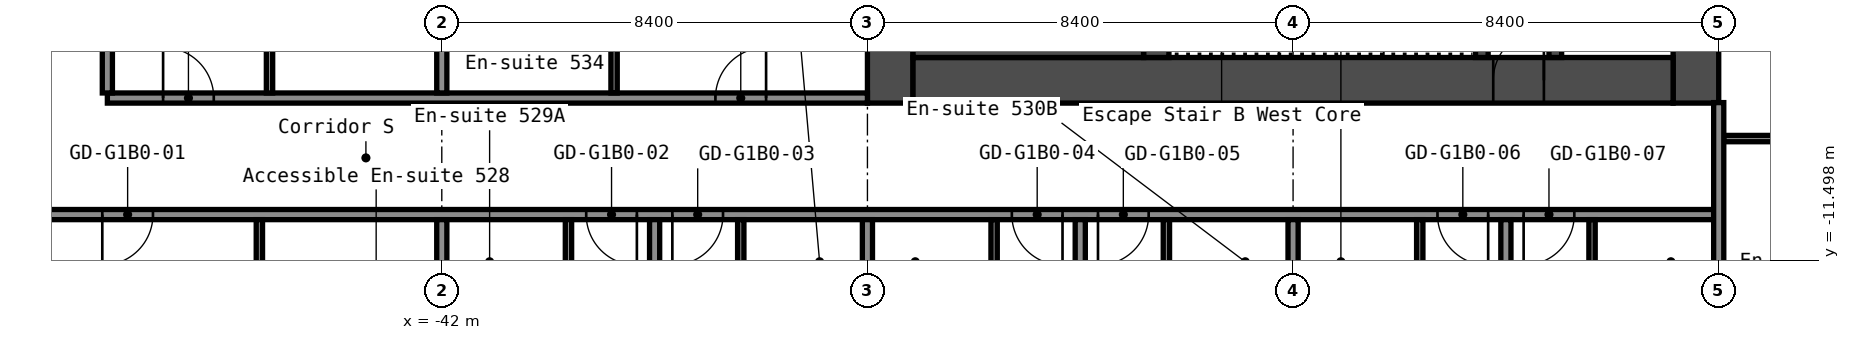
"""IFC4 building model, lengths in metres.
Left out: names, types, materials, properties, quantities, classifications, styles, units other than length and angle.
Written with IfcOpenShell. Run it as: python <this file> out.ifc"""

import sys

from ifc_helpers import new_model, si_unit, direction, frame, frame_2d, origin, place, context, subcontext, project, spatial, rectangle, extrude, element, fill, save


model = new_model("IFC4")
c1 = context("Model", 3, precision=1e-05, world=origin(), true_north=direction((0.0, 1.0)))
c2 = subcontext(c1, "Body", "Model", "MODEL_VIEW")
j1 = project(units=[si_unit("LENGTHUNIT", "METRE"), si_unit("PLANEANGLEUNIT", "RADIAN")], contexts=[c1])
p1 = place(None, origin())
s1 = spatial("IfcSite", under=j1, at=p1, CompositionType="ELEMENT")
p2 = place(p1, origin())
s2 = spatial("IfcBuilding", under=s1, at=p2, CompositionType="ELEMENT")
p3 = place(p2, frame((0.0, 0.0, 23.0)))
s3 = spatial("IfcBuildingStorey", under=s2, at=p3, CompositionType="ELEMENT", Elevation=23.0)
p4 = place(p3, frame((-17.25, -8.4, 0.0), z_axis=(0.0, 0.0, 1.0), x_axis=(0.0, 1.0, 0.0)))
e1 = element("IfcWall", 1, at=p4, inside=s3, PredefinedType="SHEAR", context=c2, shape_type="SweptSolid", body=[
    extrude(rectangle(XDim=16.8, YDim=0.9, at=frame_2d((8.4, 0.0))), origin(), (0.0, 0.0, 1.0), 2.8),
])
p5 = place(p4, frame((12.75, 0.0, 0.0)))
e2 = element("IfcOpeningElement", 2, at=p5, cuts=e1, PredefinedType="OPENING", context=c2, shape_type="SweptSolid", body=[
    extrude(rectangle(XDim=1.2, YDim=2.1, at=frame_2d((0.6, 1.05))), frame((0.0, 0.46, 0.0), z_axis=(0.0, -1.0, 0.0), x_axis=(1.0, 0.0, 0.0)), (0.0, 0.0, 1.0), 0.92),
])
p6 = place(p4, frame((2.85, 0.0, 0.0)))
e3 = element("IfcOpeningElement", 3, at=p6, cuts=e1, PredefinedType="OPENING", context=c2, shape_type="SweptSolid", body=[
    extrude(rectangle(XDim=1.2, YDim=2.1, at=frame_2d((0.6, 1.05))), frame((0.0, 0.46, 0.0), z_axis=(0.0, -1.0, 0.0), x_axis=(1.0, 0.0, 0.0)), (0.0, 0.0, 1.0), 0.92),
])
p7 = place(p3, frame((-33.15, -8.4, 0.0), z_axis=(0.0, 0.0, 1.0), x_axis=(0.0, 1.0, 0.0)))
e4 = element("IfcWall", 4, at=p7, inside=s3, PredefinedType="SHEAR", context=c2, shape_type="SweptSolid", body=[
    extrude(rectangle(XDim=16.8, YDim=0.9, at=frame_2d((8.4, 0.0))), origin(), (0.0, 0.0, 1.0), 2.8),
])
p8 = place(p3, frame((-32.7, -7.95, 0.0), z_axis=(0.0, 0.0, 1.0), x_axis=(1.0, 0.0, 0.0)))
e5 = element("IfcWall", 5, at=p8, inside=s3, PredefinedType="SHEAR", context=c2, shape_type="SweptSolid", body=[
    extrude(rectangle(XDim=15.0, YDim=0.9, at=frame_2d((7.5, 0.0))), origin(), (0.0, 0.0, 1.0), 2.8),
])
p9 = place(p8, frame((11.45, 0.0, 0.0)))
e6 = element("IfcOpeningElement", 6, at=p9, cuts=e5, PredefinedType="OPENING", context=c2, shape_type="SweptSolid", body=[
    extrude(rectangle(XDim=1.0, YDim=2.1, at=frame_2d((0.5, 1.05))), frame((0.0, 0.46, 0.0), z_axis=(0.0, -1.0, 0.0), x_axis=(1.0, 0.0, 0.0)), (0.0, 0.0, 1.0), 0.92),
])
p10 = place(p3, frame((-20.025, -7.5, 0.0), z_axis=(0.0, 0.0, 1.0), x_axis=(0.0, 1.0, 0.0)))
e7 = element("IfcWall", 7, at=p10, inside=s3, PredefinedType="SHEAR", context=c2, shape_type="SweptSolid", body=[
    extrude(rectangle(XDim=6.3, YDim=0.25, at=frame_2d((3.15, 0.0))), origin(), (0.0, 0.0, 1.0), 2.8),
])
p11 = place(p10, frame((2.4, 0.0, 0.0)))
e8 = element("IfcOpeningElement", 8, at=p11, cuts=e7, PredefinedType="OPENING", context=c2, shape_type="SweptSolid", body=[
    extrude(rectangle(XDim=1.0, YDim=2.1, at=frame_2d((0.5, 1.05))), frame((0.0, 0.135, 0.0), z_axis=(0.0, -1.0, 0.0), x_axis=(1.0, 0.0, 0.0)), (0.0, 0.0, 1.0), 0.27),
])
p12 = place(p3, frame((-21.475, -7.5, 0.0), z_axis=(0.0, 0.0, 1.0), x_axis=(0.0, 1.0, 0.0)))
e9 = element("IfcWall", 9, at=p12, inside=s3, PredefinedType="SHEAR", context=c2, shape_type="SweptSolid", body=[
    extrude(rectangle(XDim=3.75, YDim=0.25, at=frame_2d((1.875, 0.0))), origin(), (0.0, 0.0, 1.0), 2.8),
])
p13 = place(p12, frame((1.3, 0.0, 0.0)))
e10 = element("IfcOpeningElement", 10, at=p13, cuts=e9, PredefinedType="OPENING", context=c2, shape_type="SweptSolid", body=[
    extrude(rectangle(XDim=1.2, YDim=2.1, at=frame_2d((0.6, 1.05))), frame((0.0, 0.135, 0.0), z_axis=(0.0, -1.0, 0.0), x_axis=(1.0, 0.0, 0.0)), (0.0, 0.0, 1.0), 0.27),
])
p14 = place(p3, frame((-27.9, -7.5, 0.0), z_axis=(0.0, 0.0, 1.0), x_axis=(0.0, 1.0, 0.0)))
e11 = element("IfcWall", 11, at=p14, inside=s3, PredefinedType="SHEAR", context=c2, shape_type="SweptSolid", body=[
    extrude(rectangle(XDim=3.75, YDim=0.5, at=frame_2d((1.875, 0.0))), origin(), (0.0, 0.0, 1.0), 2.8),
])
p15 = place(p3, frame((-32.7, -6.75, 0.0), z_axis=(0.0, 0.0, 1.0), x_axis=(1.0, 0.0, 0.0)))
e12 = element("IfcWall", 12, at=p15, inside=s3, PredefinedType="SHEAR", context=c2, shape_type="SweptSolid", body=[
    extrude(rectangle(XDim=4.55, YDim=1.5, at=frame_2d((2.275, 0.0))), origin(), (0.0, 0.0, 1.0), 2.8),
])
p16 = place(p3, frame((-51.1, -10.6, 0.0), z_axis=(0.0, 0.0, 1.0), x_axis=(1.0, 0.0, 0.0)))
e13 = element("IfcWall", 13, at=p16, inside=s3, PredefinedType="PARTITIONING", context=c2, shape_type="SweptSolid", body=[
    extrude(rectangle(XDim=34.3, YDim=0.2, at=frame_2d((17.15, 0.0))), origin(), (0.0, 0.0, 1.0), 2.8),
])
p17 = place(p16, frame((2.4, 0.0, 0.0)))
e14 = element("IfcOpeningElement", 14, at=p17, cuts=e13, PredefinedType="OPENING", context=c2, shape_type="SweptSolid", body=[
    extrude(rectangle(XDim=1.0, YDim=2.1, at=frame_2d((0.5, 1.05))), frame((0.0, 0.11, 0.0), z_axis=(0.0, -1.0, 0.0), x_axis=(1.0, 0.0, 0.0)), (0.0, 0.0, 1.0), 0.22),
])
p18 = place(p16, frame((11.95, 0.0, 0.0)))
e15 = element("IfcOpeningElement", 15, at=p18, cuts=e13, PredefinedType="OPENING", context=c2, shape_type="SweptSolid", body=[
    extrude(rectangle(XDim=1.0, YDim=2.1, at=frame_2d((0.5, 1.05))), frame((0.0, 0.11, 0.0), z_axis=(0.0, -1.0, 0.0), x_axis=(1.0, 0.0, 0.0)), (0.0, 0.0, 1.0), 0.22),
])
p19 = place(p16, frame((13.65, 0.0, 0.0)))
e16 = element("IfcOpeningElement", 16, at=p19, cuts=e13, PredefinedType="OPENING", context=c2, shape_type="SweptSolid", body=[
    extrude(rectangle(XDim=1.0, YDim=2.1, at=frame_2d((0.5, 1.05))), frame((0.0, 0.11, 0.0), z_axis=(0.0, -1.0, 0.0), x_axis=(1.0, 0.0, 0.0)), (0.0, 0.0, 1.0), 0.22),
])
p20 = place(p16, frame((20.35, 0.0, 0.0)))
e17 = element("IfcOpeningElement", 17, at=p20, cuts=e13, PredefinedType="OPENING", context=c2, shape_type="SweptSolid", body=[
    extrude(rectangle(XDim=1.0, YDim=2.1, at=frame_2d((0.5, 1.05))), frame((0.0, 0.11, 0.0), z_axis=(0.0, -1.0, 0.0), x_axis=(1.0, 0.0, 0.0)), (0.0, 0.0, 1.0), 0.22),
])
p21 = place(p16, frame((22.05, 0.0, 0.0)))
e18 = element("IfcOpeningElement", 18, at=p21, cuts=e13, PredefinedType="OPENING", context=c2, shape_type="SweptSolid", body=[
    extrude(rectangle(XDim=1.0, YDim=2.1, at=frame_2d((0.5, 1.05))), frame((0.0, 0.11, 0.0), z_axis=(0.0, -1.0, 0.0), x_axis=(1.0, 0.0, 0.0)), (0.0, 0.0, 1.0), 0.22),
])
p22 = place(p16, frame((28.75, 0.0, 0.0)))
e19 = element("IfcOpeningElement", 19, at=p22, cuts=e13, PredefinedType="OPENING", context=c2, shape_type="SweptSolid", body=[
    extrude(rectangle(XDim=1.0, YDim=2.1, at=frame_2d((0.5, 1.05))), frame((0.0, 0.11, 0.0), z_axis=(0.0, -1.0, 0.0), x_axis=(1.0, 0.0, 0.0)), (0.0, 0.0, 1.0), 0.22),
])
p23 = place(p16, frame((30.45, 0.0, 0.0)))
e20 = element("IfcOpeningElement", 20, at=p23, cuts=e13, PredefinedType="OPENING", context=c2, shape_type="SweptSolid", body=[
    extrude(rectangle(XDim=1.0, YDim=2.1, at=frame_2d((0.5, 1.05))), frame((0.0, 0.11, 0.0), z_axis=(0.0, -1.0, 0.0), x_axis=(1.0, 0.0, 0.0)), (0.0, 0.0, 1.0), 0.22),
])
p24 = place(p3, frame((-16.7, -9.1, 0.0), z_axis=(0.0, 0.0, 1.0), x_axis=(1.0, 0.0, 0.0)))
e21 = element("IfcWall", 21, at=p24, inside=s3, PredefinedType="PARTITIONING", context=c2, shape_type="SweptSolid", body=[
    extrude(rectangle(XDim=2.337, YDim=0.125, at=frame_2d((1.169, 0.0))), origin(), (0.0, 0.0, 1.0), 2.8),
])
p25 = place(p3, frame((-48.6, -8.3, 0.0), z_axis=(0.0, 0.0, 1.0), x_axis=(1.0, 0.0, 0.0)))
e22 = element("IfcWall", 22, at=p25, inside=s3, PredefinedType="PARTITIONING", context=c2, shape_type="SweptSolid", body=[
    extrude(rectangle(XDim=15.0, YDim=0.2, at=frame_2d((7.5, 0.0))), origin(), (0.0, 0.0, 1.0), 2.8),
])
p26 = place(p25, frame((1.1, 0.0, 0.0)))
e23 = element("IfcOpeningElement", 23, at=p26, cuts=e22, PredefinedType="OPENING", context=c2, shape_type="SweptSolid", body=[
    extrude(rectangle(XDim=1.0, YDim=2.1, at=frame_2d((0.5, 1.05))), frame((0.0, 0.11, 0.0), z_axis=(0.0, -1.0, 0.0), x_axis=(1.0, 0.0, 0.0)), (0.0, 0.0, 1.0), 0.22),
])
p27 = place(p25, frame((12.0, 0.0, 0.0)))
e24 = element("IfcOpeningElement", 24, at=p27, cuts=e22, PredefinedType="OPENING", context=c2, shape_type="SweptSolid", body=[
    extrude(rectangle(XDim=1.0, YDim=2.1, at=frame_2d((0.5, 1.05))), frame((0.0, 0.11, 0.0), z_axis=(0.0, -1.0, 0.0), x_axis=(1.0, 0.0, 0.0)), (0.0, 0.0, 1.0), 0.22),
])
p28 = place(p3, frame((-48.6, -8.2, 0.0), z_axis=(0.0, 0.0, 1.0), x_axis=(0.0, 1.0, 0.0)))
e25 = element("IfcWall", 25, at=p28, inside=s3, PredefinedType="PARTITIONING", context=c2, shape_type="SweptSolid", body=[
    extrude(rectangle(XDim=16.4, YDim=0.2, at=frame_2d((8.2, 0.0))), origin(), (0.0, 0.0, 1.0), 2.8),
])
p29 = place(p3, frame((-45.6, -14.0, 0.0), z_axis=(0.0, 0.0, 1.0), x_axis=(0.0, 1.0, 0.0)))
e26 = element("IfcWall", 26, at=p29, inside=s3, PredefinedType="PARTITIONING", context=c2, shape_type="SweptSolid", body=[
    extrude(rectangle(XDim=3.3, YDim=0.125, at=frame_2d((1.65, 0.0))), origin(), (0.0, 0.0, 1.0), 2.8),
])
p30 = place(p29, frame((1.2, 0.0, 0.0)))
e27 = element("IfcOpeningElement", 27, at=p30, cuts=e26, PredefinedType="OPENING", context=c2, shape_type="SweptSolid", body=[
    extrude(rectangle(XDim=1.0, YDim=2.1, at=frame_2d((0.5, 1.05))), frame((0.0, 0.073, 0.0), z_axis=(0.0, -1.0, 0.0), x_axis=(1.0, 0.0, 0.0)), (0.0, 0.0, 1.0), 0.145),
])
p31 = place(p3, frame((-45.4, -8.2, 0.0), z_axis=(0.0, 0.0, 1.0), x_axis=(0.0, 1.0, 0.0)))
e28 = element("IfcWall", 28, at=p31, inside=s3, PredefinedType="PARTITIONING", context=c2, shape_type="SweptSolid", body=[
    extrude(rectangle(XDim=3.3, YDim=0.125, at=frame_2d((1.65, 0.0))), origin(), (0.0, 0.0, 1.0), 2.8),
])
p32 = place(p3, frame((-42.0, -20.3, 0.0), z_axis=(0.0, 0.0, 1.0), x_axis=(0.0, 1.0, 0.0)))
e29 = element("IfcWall", 29, at=p32, inside=s3, PredefinedType="PARTITIONING", context=c2, shape_type="SweptSolid", body=[
    extrude(rectangle(XDim=9.6, YDim=0.2, at=frame_2d((4.8, 0.0))), origin(), (0.0, 0.0, 1.0), 2.8),
])
p33 = place(p3, frame((-42.0, -8.2, 0.0), z_axis=(0.0, 0.0, 1.0), x_axis=(0.0, 1.0, 0.0)))
e30 = element("IfcWall", 30, at=p33, inside=s3, PredefinedType="PARTITIONING", context=c2, shape_type="SweptSolid", body=[
    extrude(rectangle(XDim=8.2, YDim=0.2, at=frame_2d((4.1, 0.0))), origin(), (0.0, 0.0, 1.0), 2.8),
])
p34 = place(p3, frame((-39.5, -13.6, 0.0), z_axis=(0.0, 0.0, 1.0), x_axis=(0.0, 1.0, 0.0)))
e31 = element("IfcWall", 31, at=p34, inside=s3, PredefinedType="PARTITIONING", context=c2, shape_type="SweptSolid", body=[
    extrude(rectangle(XDim=2.9, YDim=0.125, at=frame_2d((1.45, 0.0))), origin(), (0.0, 0.0, 1.0), 2.8),
])
p35 = place(p34, frame((0.6, 0.0, 0.0)))
e32 = element("IfcOpeningElement", 32, at=p35, cuts=e31, PredefinedType="OPENING", context=c2, shape_type="SweptSolid", body=[
    extrude(rectangle(XDim=0.8, YDim=2.1, at=frame_2d((0.4, 1.05))), frame((0.0, 0.073, 0.0), z_axis=(0.0, -1.0, 0.0), x_axis=(1.0, 0.0, 0.0)), (0.0, 0.0, 1.0), 0.145),
])
p36 = place(p3, frame((-38.6, -8.2, 0.0), z_axis=(0.0, 0.0, 1.0), x_axis=(0.0, 1.0, 0.0)))
e33 = element("IfcWall", 33, at=p36, inside=s3, PredefinedType="PARTITIONING", context=c2, shape_type="SweptSolid", body=[
    extrude(rectangle(XDim=3.3, YDim=0.125, at=frame_2d((1.65, 0.0))), origin(), (0.0, 0.0, 1.0), 2.8),
])
p37 = place(p3, frame((-37.8, -20.3, 0.0), z_axis=(0.0, 0.0, 1.0), x_axis=(0.0, 1.0, 0.0)))
e34 = element("IfcWall", 34, at=p37, inside=s3, PredefinedType="PARTITIONING", context=c2, shape_type="SweptSolid", body=[
    extrude(rectangle(XDim=9.6, YDim=0.2, at=frame_2d((4.8, 0.0))), origin(), (0.0, 0.0, 1.0), 2.8),
])
p38 = place(p3, frame((-36.1, -13.6, 0.0), z_axis=(0.0, 0.0, 1.0), x_axis=(0.0, 1.0, 0.0)))
e35 = element("IfcWall", 35, at=p38, inside=s3, PredefinedType="PARTITIONING", context=c2, shape_type="SweptSolid", body=[
    extrude(rectangle(XDim=2.9, YDim=0.125, at=frame_2d((1.45, 0.0))), origin(), (0.0, 0.0, 1.0), 2.8),
])
p39 = place(p38, frame((0.6, 0.0, 0.0)))
e36 = element("IfcOpeningElement", 36, at=p39, cuts=e35, PredefinedType="OPENING", context=c2, shape_type="SweptSolid", body=[
    extrude(rectangle(XDim=0.8, YDim=2.1, at=frame_2d((0.4, 1.05))), frame((0.0, 0.073, 0.0), z_axis=(0.0, -1.0, 0.0), x_axis=(1.0, 0.0, 0.0)), (0.0, 0.0, 1.0), 0.145),
])
p40 = place(p3, frame((-33.6, -20.3, 0.0), z_axis=(0.0, 0.0, 1.0), x_axis=(0.0, 1.0, 0.0)))
e37 = element("IfcWall", 37, at=p40, inside=s3, PredefinedType="PARTITIONING", context=c2, shape_type="SweptSolid", body=[
    extrude(rectangle(XDim=9.6, YDim=0.2, at=frame_2d((4.8, 0.0))), origin(), (0.0, 0.0, 1.0), 2.8),
])
p41 = place(p3, frame((-31.1, -13.6, 0.0), z_axis=(0.0, 0.0, 1.0), x_axis=(0.0, 1.0, 0.0)))
e38 = element("IfcWall", 38, at=p41, inside=s3, PredefinedType="PARTITIONING", context=c2, shape_type="SweptSolid", body=[
    extrude(rectangle(XDim=2.9, YDim=0.125, at=frame_2d((1.45, 0.0))), origin(), (0.0, 0.0, 1.0), 2.8),
])
p42 = place(p41, frame((0.6, 0.0, 0.0)))
e39 = element("IfcOpeningElement", 39, at=p42, cuts=e38, PredefinedType="OPENING", context=c2, shape_type="SweptSolid", body=[
    extrude(rectangle(XDim=0.8, YDim=2.1, at=frame_2d((0.4, 1.05))), frame((0.0, 0.073, 0.0), z_axis=(0.0, -1.0, 0.0), x_axis=(1.0, 0.0, 0.0)), (0.0, 0.0, 1.0), 0.145),
])
p43 = place(p3, frame((-29.4, -20.3, 0.0), z_axis=(0.0, 0.0, 1.0), x_axis=(0.0, 1.0, 0.0)))
e40 = element("IfcWall", 40, at=p43, inside=s3, PredefinedType="PARTITIONING", context=c2, shape_type="SweptSolid", body=[
    extrude(rectangle(XDim=9.6, YDim=0.2, at=frame_2d((4.8, 0.0))), origin(), (0.0, 0.0, 1.0), 2.8),
])
p44 = place(p3, frame((-27.7, -13.6, 0.0), z_axis=(0.0, 0.0, 1.0), x_axis=(0.0, 1.0, 0.0)))
e41 = element("IfcWall", 41, at=p44, inside=s3, PredefinedType="PARTITIONING", context=c2, shape_type="SweptSolid", body=[
    extrude(rectangle(XDim=2.9, YDim=0.125, at=frame_2d((1.45, 0.0))), origin(), (0.0, 0.0, 1.0), 2.8),
])
p45 = place(p44, frame((0.6, 0.0, 0.0)))
e42 = element("IfcOpeningElement", 42, at=p45, cuts=e41, PredefinedType="OPENING", context=c2, shape_type="SweptSolid", body=[
    extrude(rectangle(XDim=0.8, YDim=2.1, at=frame_2d((0.4, 1.05))), frame((0.0, 0.073, 0.0), z_axis=(0.0, -1.0, 0.0), x_axis=(1.0, 0.0, 0.0)), (0.0, 0.0, 1.0), 0.145),
])
p46 = place(p3, frame((-25.2, -20.3, 0.0), z_axis=(0.0, 0.0, 1.0), x_axis=(0.0, 1.0, 0.0)))
e43 = element("IfcWall", 43, at=p46, inside=s3, PredefinedType="PARTITIONING", context=c2, shape_type="SweptSolid", body=[
    extrude(rectangle(XDim=9.6, YDim=0.2, at=frame_2d((4.8, 0.0))), origin(), (0.0, 0.0, 1.0), 2.8),
])
p47 = place(p3, frame((-22.7, -13.6, 0.0), z_axis=(0.0, 0.0, 1.0), x_axis=(0.0, 1.0, 0.0)))
e44 = element("IfcWall", 44, at=p47, inside=s3, PredefinedType="PARTITIONING", context=c2, shape_type="SweptSolid", body=[
    extrude(rectangle(XDim=2.9, YDim=0.125, at=frame_2d((1.45, 0.0))), origin(), (0.0, 0.0, 1.0), 2.8),
])
p48 = place(p47, frame((0.6, 0.0, 0.0)))
e45 = element("IfcOpeningElement", 45, at=p48, cuts=e44, PredefinedType="OPENING", context=c2, shape_type="SweptSolid", body=[
    extrude(rectangle(XDim=0.8, YDim=2.1, at=frame_2d((0.4, 1.05))), frame((0.0, 0.073, 0.0), z_axis=(0.0, -1.0, 0.0), x_axis=(1.0, 0.0, 0.0)), (0.0, 0.0, 1.0), 0.145),
])
p49 = place(p3, frame((-21.0, -20.3, 0.0), z_axis=(0.0, 0.0, 1.0), x_axis=(0.0, 1.0, 0.0)))
e46 = element("IfcWall", 46, at=p49, inside=s3, PredefinedType="PARTITIONING", context=c2, shape_type="SweptSolid", body=[
    extrude(rectangle(XDim=9.6, YDim=0.2, at=frame_2d((4.8, 0.0))), origin(), (0.0, 0.0, 1.0), 2.8),
])
p50 = place(p3, frame((-19.3, -13.6, 0.0), z_axis=(0.0, 0.0, 1.0), x_axis=(0.0, 1.0, 0.0)))
e47 = element("IfcWall", 47, at=p50, inside=s3, PredefinedType="PARTITIONING", context=c2, shape_type="SweptSolid", body=[
    extrude(rectangle(XDim=2.9, YDim=0.125, at=frame_2d((1.45, 0.0))), origin(), (0.0, 0.0, 1.0), 2.8),
])
p51 = place(p50, frame((0.6, 0.0, 0.0)))
e48 = element("IfcOpeningElement", 48, at=p51, cuts=e47, PredefinedType="OPENING", context=c2, shape_type="SweptSolid", body=[
    extrude(rectangle(XDim=0.8, YDim=2.1, at=frame_2d((0.4, 1.05))), frame((0.0, 0.073, 0.0), z_axis=(0.0, -1.0, 0.0), x_axis=(1.0, 0.0, 0.0)), (0.0, 0.0, 1.0), 0.145),
])
p52 = place(p3, frame((-16.8, -20.3, 0.0), z_axis=(0.0, 0.0, 1.0), x_axis=(0.0, 1.0, 0.0)))
e49 = element("IfcWall", 49, at=p52, inside=s3, PredefinedType="PARTITIONING", context=c2, shape_type="SweptSolid", body=[
    extrude(rectangle(XDim=11.91, YDim=0.2, at=frame_2d((5.955, 0.0))), origin(), (0.0, 0.0, 1.0), 2.8),
])
p53 = place(p9, origin())
e50 = element("IfcDoor", 50, at=p53, inside=s3, OperationType="SINGLE_SWING_LEFT", PredefinedType="DOOR", context=c2, shape_type="SweptSolid", body=[
    extrude(rectangle(XDim=1.0, YDim=2.1, at=frame_2d((0.5, 1.05))), frame((0.0, 0.025, 0.0), z_axis=(0.0, -1.0, 0.0), x_axis=(1.0, 0.0, 0.0)), (0.0, 0.0, 1.0), 0.05),
])
fill(e6, e50)
p54 = place(p17, origin())
e51 = element("IfcDoor", 51, at=p54, inside=s3, OperationType="SINGLE_SWING_LEFT", PredefinedType="DOOR", context=c2, shape_type="SweptSolid", body=[
    extrude(rectangle(XDim=1.0, YDim=2.1, at=frame_2d((0.5, 1.05))), frame((0.0, 0.025, 0.0), z_axis=(0.0, -1.0, 0.0), x_axis=(1.0, 0.0, 0.0)), (0.0, 0.0, 1.0), 0.05),
])
fill(e14, e51)
p55 = place(p18, origin())
e52 = element("IfcDoor", 52, at=p55, inside=s3, OperationType="SINGLE_SWING_RIGHT", PredefinedType="DOOR", context=c2, shape_type="SweptSolid", body=[
    extrude(rectangle(XDim=1.0, YDim=2.1, at=frame_2d((0.5, 1.05))), frame((0.0, 0.025, 0.0), z_axis=(0.0, -1.0, 0.0), x_axis=(1.0, 0.0, 0.0)), (0.0, 0.0, 1.0), 0.05),
])
fill(e15, e52)
p56 = place(p19, origin())
e53 = element("IfcDoor", 53, at=p56, inside=s3, OperationType="SINGLE_SWING_LEFT", PredefinedType="DOOR", context=c2, shape_type="SweptSolid", body=[
    extrude(rectangle(XDim=1.0, YDim=2.1, at=frame_2d((0.5, 1.05))), frame((0.0, 0.025, 0.0), z_axis=(0.0, -1.0, 0.0), x_axis=(1.0, 0.0, 0.0)), (0.0, 0.0, 1.0), 0.05),
])
fill(e16, e53)
p57 = place(p20, origin())
e54 = element("IfcDoor", 54, at=p57, inside=s3, OperationType="SINGLE_SWING_RIGHT", PredefinedType="DOOR", context=c2, shape_type="SweptSolid", body=[
    extrude(rectangle(XDim=1.0, YDim=2.1, at=frame_2d((0.5, 1.05))), frame((0.0, 0.025, 0.0), z_axis=(0.0, -1.0, 0.0), x_axis=(1.0, 0.0, 0.0)), (0.0, 0.0, 1.0), 0.05),
])
fill(e17, e54)
p58 = place(p21, origin())
e55 = element("IfcDoor", 55, at=p58, inside=s3, OperationType="SINGLE_SWING_LEFT", PredefinedType="DOOR", context=c2, shape_type="SweptSolid", body=[
    extrude(rectangle(XDim=1.0, YDim=2.1, at=frame_2d((0.5, 1.05))), frame((0.0, 0.025, 0.0), z_axis=(0.0, -1.0, 0.0), x_axis=(1.0, 0.0, 0.0)), (0.0, 0.0, 1.0), 0.05),
])
fill(e18, e55)
p59 = place(p22, origin())
e56 = element("IfcDoor", 56, at=p59, inside=s3, OperationType="SINGLE_SWING_RIGHT", PredefinedType="DOOR", context=c2, shape_type="SweptSolid", body=[
    extrude(rectangle(XDim=1.0, YDim=2.1, at=frame_2d((0.5, 1.05))), frame((0.0, 0.025, 0.0), z_axis=(0.0, -1.0, 0.0), x_axis=(1.0, 0.0, 0.0)), (0.0, 0.0, 1.0), 0.05),
])
fill(e19, e56)
p60 = place(p23, origin())
e57 = element("IfcDoor", 57, at=p60, inside=s3, OperationType="SINGLE_SWING_LEFT", PredefinedType="DOOR", context=c2, shape_type="SweptSolid", body=[
    extrude(rectangle(XDim=1.0, YDim=2.1, at=frame_2d((0.5, 1.05))), frame((0.0, 0.025, 0.0), z_axis=(0.0, -1.0, 0.0), x_axis=(1.0, 0.0, 0.0)), (0.0, 0.0, 1.0), 0.05),
])
fill(e20, e57)
p61 = place(p26, origin())
e58 = element("IfcDoor", 58, at=p61, inside=s3, OperationType="SINGLE_SWING_RIGHT", PredefinedType="DOOR", context=c2, shape_type="SweptSolid", body=[
    extrude(rectangle(XDim=1.0, YDim=2.1, at=frame_2d((0.5, 1.05))), frame((0.0, 0.025, 0.0), z_axis=(0.0, -1.0, 0.0), x_axis=(1.0, 0.0, 0.0)), (0.0, 0.0, 1.0), 0.05),
])
fill(e23, e58)
p62 = place(p27, origin())
e59 = element("IfcDoor", 59, at=p62, inside=s3, OperationType="SINGLE_SWING_LEFT", PredefinedType="DOOR", context=c2, shape_type="SweptSolid", body=[
    extrude(rectangle(XDim=1.0, YDim=2.1, at=frame_2d((0.5, 1.05))), frame((0.0, 0.025, 0.0), z_axis=(0.0, -1.0, 0.0), x_axis=(1.0, 0.0, 0.0)), (0.0, 0.0, 1.0), 0.05),
])
fill(e24, e59)
save(model, sys.argv[1])
